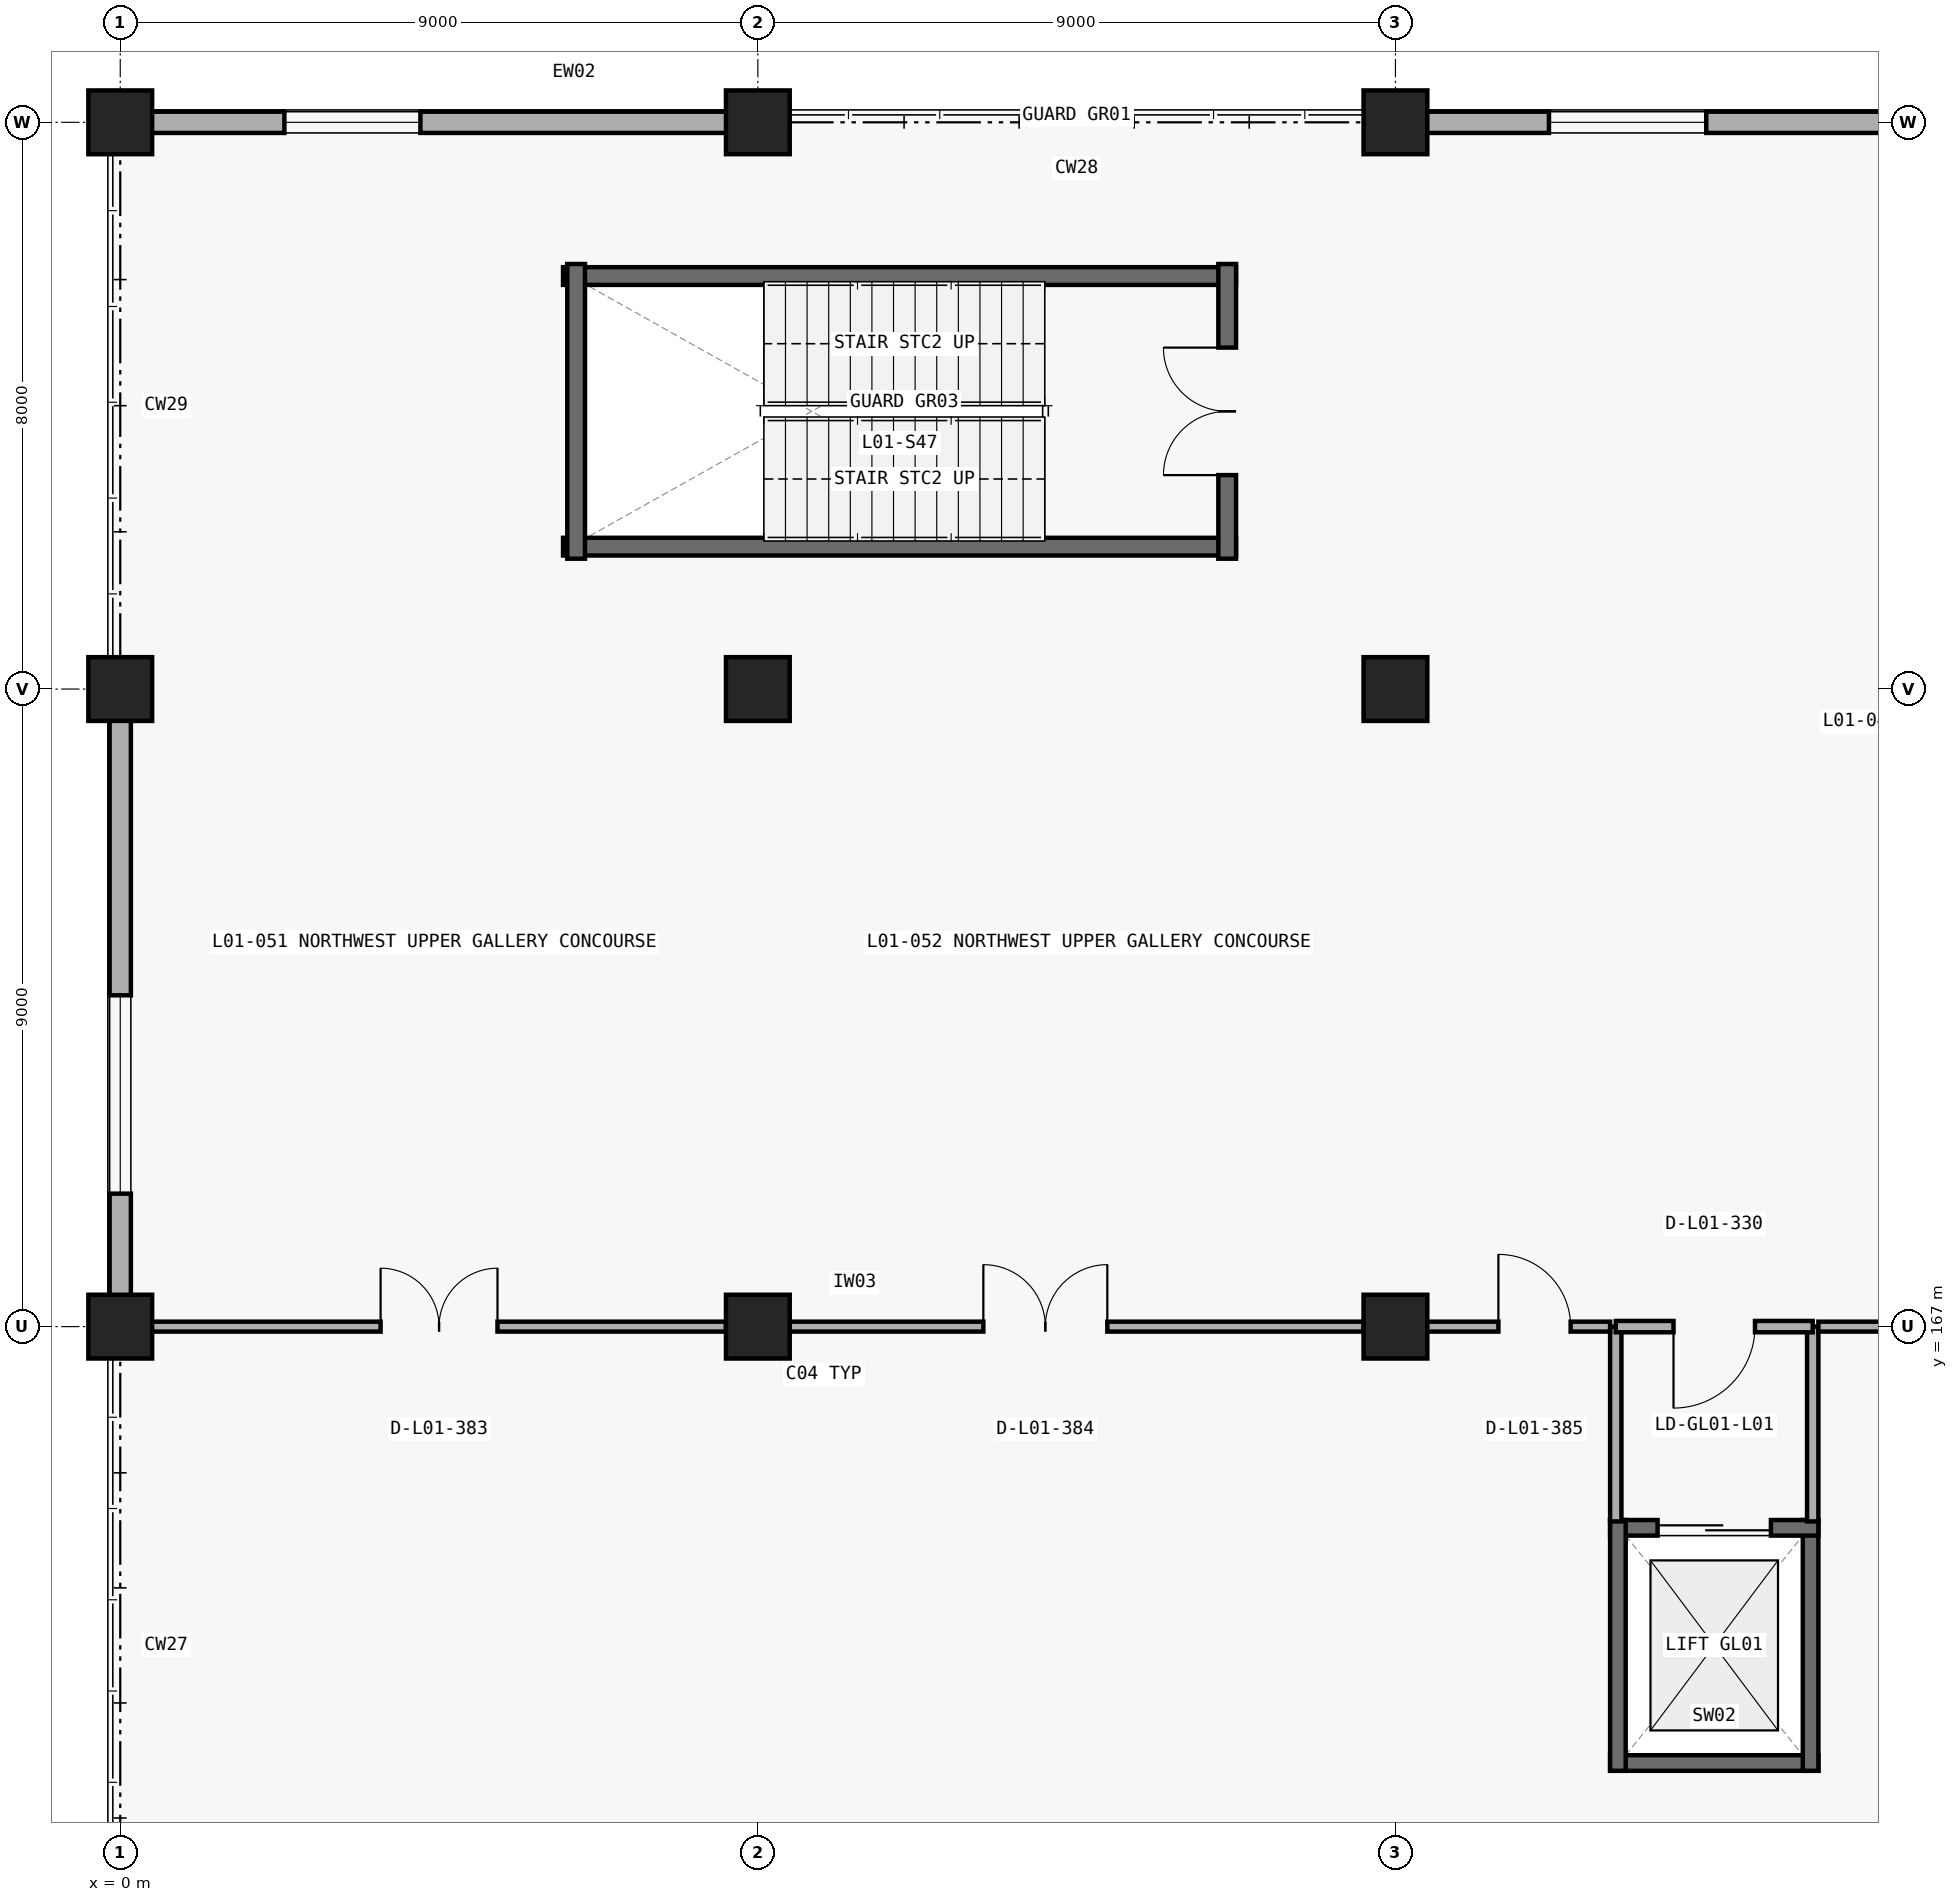
"""IFC4 building model, lengths in metres.
Left out: names, types, materials, properties, quantities, classifications, styles, units other than length and angle.
Written with IfcOpenShell. Run it as: python <this file> out.ifc"""

import sys

from ifc_helpers import new_model, si_unit, direction, frame, frame_2d, origin, origin_2d, place, context, subcontext, project, spatial, rectangle, extrude, element, fill, save


model = new_model("IFC4")
c1 = context("Model", 3, precision=1e-05, world=origin(), true_north=direction((0.0, 1.0)))
c2 = subcontext(c1, "Body", "Model", "MODEL_VIEW")
j1 = project(units=[si_unit("LENGTHUNIT", "METRE"), si_unit("PLANEANGLEUNIT", "RADIAN")], contexts=[c1])
p1 = place(None, origin())
s1 = spatial("IfcSite", under=j1, at=p1, CompositionType="ELEMENT")
p2 = place(p1, origin())
s2 = spatial("IfcBuilding", under=s1, at=p2, CompositionType="ELEMENT")
p3 = place(p2, frame((0.0, 0.0, 5.4)))
s3 = spatial("IfcBuildingStorey", under=s2, at=p3, CompositionType="ELEMENT", Elevation=5.4)
for number, where, z_axis, x_axis in (
    (1, (0.0, 167.0, 0.0), (0.0, 0.0, 1.0), (1.0, 0.0, 0.0)),
    (2, (0.0, 176.0, 0.0), (0.0, 0.0, 1.0), (1.0, 0.0, 0.0)),
    (3, (0.0, 184.0, 0.0), (0.0, 0.0, 1.0), (1.0, 0.0, 0.0)),
    (4, (9.0, 167.0, 0.0), (0.0, 0.0, 1.0), (1.0, 0.0, 0.0)),
    (5, (9.0, 176.0, 0.0), (0.0, 0.0, 1.0), (1.0, 0.0, 0.0)),
    (6, (9.0, 184.0, 0.0), (0.0, 0.0, 1.0), (1.0, 0.0, 0.0)),
    (7, (18.0, 167.0, 0.0), (0.0, 0.0, 1.0), (1.0, 0.0, 0.0)),
    (8, (18.0, 176.0, 0.0), (0.0, 0.0, 1.0), (1.0, 0.0, 0.0)),
    (9, (18.0, 184.0, 0.0), (0.0, 0.0, 1.0), (1.0, 0.0, 0.0)),
):
    element("IfcColumn", number, at=place(p3, frame(where, z_axis=z_axis, x_axis=x_axis)), inside=s3, PredefinedType="COLUMN", context=c2, shape_type="SweptSolid", body=[
        extrude(rectangle(XDim=0.9, YDim=0.9, at=origin_2d()), origin(), (0.0, 0.0, 1.0), 4.8),
    ])
p4 = place(p3, frame((0.0, 167.425, 0.0), z_axis=(0.0, 0.0, 1.0), x_axis=(0.0, 1.0, 0.0)))
e10 = element("IfcWall", 10, at=p4, inside=s3, PredefinedType="STANDARD", context=c2, shape_type="SweptSolid", body=[
    extrude(rectangle(XDim=8.15, YDim=0.3, at=frame_2d((4.075, 0.0))), origin(), (0.0, 0.0, 1.0), 3.837),
])
p5 = place(p4, frame((1.452, 0.0, 0.95)))
e11 = element("IfcOpeningElement", 11, at=p5, cuts=e10, PredefinedType="OPENING", context=c2, shape_type="SweptSolid", body=[
    extrude(rectangle(XDim=2.8, YDim=2.4, at=frame_2d((1.4, 1.2))), frame((0.0, 0.16, 0.0), z_axis=(0.0, -1.0, 0.0), x_axis=(1.0, 0.0, 0.0)), (0.0, 0.0, 1.0), 0.32),
])
p6 = place(p3, frame((0.425, 184.0, 0.0), z_axis=(0.0, 0.0, 1.0), x_axis=(1.0, 0.0, 0.0)))
e12 = element("IfcWall", 12, at=p6, inside=s3, PredefinedType="STANDARD", context=c2, shape_type="SweptSolid", body=[
    extrude(rectangle(XDim=8.15, YDim=0.3, at=frame_2d((4.075, 0.0))), origin(), (0.0, 0.0, 1.0), 3.804),
])
p7 = place(p6, frame((1.892, 0.0, 0.95)))
e13 = element("IfcOpeningElement", 13, at=p7, cuts=e12, PredefinedType="OPENING", context=c2, shape_type="SweptSolid", body=[
    extrude(rectangle(XDim=1.92, YDim=2.18, at=frame_2d((0.96, 1.09))), frame((0.0, 0.16, 0.0), z_axis=(0.0, -1.0, 0.0), x_axis=(1.0, 0.0, 0.0)), (0.0, 0.0, 1.0), 0.32),
])
p8 = place(p3, frame((18.425, 184.0, 0.0), z_axis=(0.0, 0.0, 1.0), x_axis=(1.0, 0.0, 0.0)))
e14 = element("IfcWall", 14, at=p8, inside=s3, PredefinedType="STANDARD", context=c2, shape_type="SweptSolid", body=[
    extrude(rectangle(XDim=8.15, YDim=0.3, at=frame_2d((4.075, 0.0))), origin(), (0.0, 0.0, 1.0), 3.804),
])
p9 = place(p8, frame((1.742, 0.0, 0.95)))
e15 = element("IfcOpeningElement", 15, at=p9, cuts=e14, PredefinedType="OPENING", context=c2, shape_type="SweptSolid", body=[
    extrude(rectangle(XDim=2.22, YDim=2.24, at=frame_2d((1.11, 1.12))), frame((0.0, 0.16, 0.0), z_axis=(0.0, -1.0, 0.0), x_axis=(1.0, 0.0, 0.0)), (0.0, 0.0, 1.0), 0.32),
])
for number, where, z_axis, x_axis in (
    (16, (15.75, 181.83, 0.0), (0.0, 0.0, 1.0), (-1.0, 0.0, 0.0)),
    (17, (6.25, 178.01, 0.0), (0.0, 0.0, 1.0), (1.0, 0.0, 0.0)),
):
    element("IfcWall", number, at=place(p3, frame(where, z_axis=z_axis, x_axis=x_axis)), inside=s3, PredefinedType="SHEAR", context=c2, shape_type="SweptSolid", body=[
        extrude(rectangle(XDim=9.5, YDim=0.25, at=frame_2d((4.75, 0.0))), origin(), (0.0, 0.0, 1.0), 4.52),
    ])
p10 = place(p3, frame((15.625, 177.84, 0.0), z_axis=(0.0, 0.0, 1.0), x_axis=(0.0, 1.0, 0.0)))
e18 = element("IfcWall", 18, at=p10, inside=s3, PredefinedType="SHEAR", context=c2, shape_type="SweptSolid", body=[
    extrude(rectangle(XDim=4.16, YDim=0.25, at=frame_2d((2.08, 0.0))), origin(), (0.0, 0.0, 1.0), 4.52),
])
p11 = place(p10, frame((1.18, 0.0, 0.0)))
e19 = element("IfcOpeningElement", 19, at=p11, cuts=e18, PredefinedType="OPENING", context=c2, shape_type="SweptSolid", body=[
    extrude(rectangle(XDim=1.8, YDim=2.25, at=frame_2d((0.9, 1.125))), frame((0.0, 0.135, 0.0), z_axis=(0.0, -1.0, 0.0), x_axis=(1.0, 0.0, 0.0)), (0.0, 0.0, 1.0), 0.27),
])
p12 = place(p3, frame((6.435, 182.0, 0.0), z_axis=(0.0, 0.0, 1.0), x_axis=(0.0, -1.0, 0.0)))
e20 = element("IfcWall", 20, at=p12, inside=s3, PredefinedType="SHEAR", context=c2, shape_type="SweptSolid", body=[
    extrude(rectangle(XDim=4.16, YDim=0.25, at=frame_2d((2.08, 0.0))), origin(), (0.0, 0.0, 1.0), 4.52),
])
p13 = place(p3, frame((21.03, 160.84, 0.0), z_axis=(0.0, 0.0, 1.0), x_axis=(1.0, 0.0, 0.0)))
e21 = element("IfcWall", 21, at=p13, inside=s3, PredefinedType="SHEAR", context=c2, shape_type="SweptSolid", body=[
    extrude(rectangle(XDim=2.94, YDim=0.22, at=frame_2d((1.47, 0.0))), origin(), (0.0, 0.0, 1.0), 4.52),
])
p14 = place(p3, frame((23.86, 160.73, 0.0), z_axis=(0.0, 0.0, 1.0), x_axis=(0.0, 1.0, 0.0)))
e22 = element("IfcWall", 22, at=p14, inside=s3, PredefinedType="SHEAR", context=c2, shape_type="SweptSolid", body=[
    extrude(rectangle(XDim=3.54, YDim=0.22, at=frame_2d((1.77, 0.0))), origin(), (0.0, 0.0, 1.0), 4.52),
])
p15 = place(p3, frame((23.97, 164.16, 0.0), z_axis=(0.0, 0.0, 1.0), x_axis=(-1.0, 0.0, 0.0)))
e23 = element("IfcWall", 23, at=p15, inside=s3, PredefinedType="SHEAR", context=c2, shape_type="SweptSolid", body=[
    extrude(rectangle(XDim=2.94, YDim=0.22, at=frame_2d((1.47, 0.0))), origin(), (0.0, 0.0, 1.0), 4.52),
])
p16 = place(p15, frame((0.67, 0.0, 0.0)))
e24 = element("IfcOpeningElement", 24, at=p16, cuts=e23, PredefinedType="OPENING", context=c2, shape_type="SweptSolid", body=[
    extrude(rectangle(XDim=1.6, YDim=2.3, at=frame_2d((0.8, 1.15))), frame((0.0, 0.12, 0.0), z_axis=(0.0, -1.0, 0.0), x_axis=(1.0, 0.0, 0.0)), (0.0, 0.0, 1.0), 0.24),
])
p17 = place(p3, frame((21.14, 164.27, 0.0), z_axis=(0.0, 0.0, 1.0), x_axis=(0.0, -1.0, 0.0)))
e25 = element("IfcWall", 25, at=p17, inside=s3, PredefinedType="SHEAR", context=c2, shape_type="SweptSolid", body=[
    extrude(rectangle(XDim=3.54, YDim=0.22, at=frame_2d((1.77, 0.0))), origin(), (0.0, 0.0, 1.0), 4.52),
])
for number, where, z_axis, x_axis in (
    (26, (23.89, 164.25, 0.0), (0.0, 0.0, 1.0), (0.0, 1.0, 0.0)),
    (27, (21.11, 164.25, 0.0), (0.0, 0.0, 1.0), (0.0, 1.0, 0.0)),
):
    element("IfcWall", number, at=place(p3, frame(where, z_axis=z_axis, x_axis=x_axis)), inside=s3, PredefinedType="PARTITIONING", context=c2, shape_type="SweptSolid", body=[
        extrude(rectangle(XDim=2.75, YDim=0.16, at=frame_2d((1.375, 0.0))), origin(), (0.0, 0.0, 1.0), 3.804),
    ])
p18 = place(p3, frame((23.89, 167.0, 0.0), z_axis=(0.0, 0.0, 1.0), x_axis=(-1.0, 0.0, 0.0)))
e28 = element("IfcWall", 28, at=p18, inside=s3, PredefinedType="PARTITIONING", context=c2, shape_type="SweptSolid", body=[
    extrude(rectangle(XDim=2.78, YDim=0.16, at=frame_2d((1.39, 0.0))), origin(), (0.0, 0.0, 1.0), 3.804),
])
p19 = place(p18, frame((0.815, 0.0, 0.0)))
e29 = element("IfcOpeningElement", 29, at=p19, cuts=e28, PredefinedType="OPENING", context=c2, shape_type="SweptSolid", body=[
    extrude(rectangle(XDim=1.15, YDim=2.2, at=frame_2d((0.575, 1.1))), frame((0.0, 0.09, 0.0), z_axis=(0.0, -1.0, 0.0), x_axis=(1.0, 0.0, 0.0)), (0.0, 0.0, 1.0), 0.18),
])
p20 = place(p3, frame((0.435, 167.0, 0.0), z_axis=(0.0, 0.0, 1.0), x_axis=(1.0, 0.0, 0.0)))
e30 = element("IfcWall", 30, at=p20, inside=s3, PredefinedType="PARTITIONING", context=c2, shape_type="SweptSolid", body=[
    extrude(rectangle(XDim=8.13, YDim=0.14, at=frame_2d((4.065, 0.0))), origin(), (0.0, 0.0, 1.0), 3.804),
])
p21 = place(p20, frame((3.24, 0.0, 0.0)))
e31 = element("IfcOpeningElement", 31, at=p21, cuts=e30, PredefinedType="OPENING", context=c2, shape_type="SweptSolid", body=[
    extrude(rectangle(XDim=1.65, YDim=2.25, at=frame_2d((0.825, 1.125))), frame((0.0, 0.08, 0.0), z_axis=(0.0, -1.0, 0.0), x_axis=(1.0, 0.0, 0.0)), (0.0, 0.0, 1.0), 0.16),
])
p22 = place(p3, frame((8.55, 167.0, 0.0), z_axis=(0.0, 0.0, 1.0), x_axis=(1.0, 0.0, 0.0)))
e32 = element("IfcWall", 32, at=p22, inside=s3, PredefinedType="PARTITIONING", context=c2, shape_type="SweptSolid", body=[
    extrude(rectangle(XDim=9.015, YDim=0.14, at=frame_2d((4.507, 0.0))), origin(), (0.0, 0.0, 1.0), 3.804),
])
p23 = place(p22, frame((3.633, 0.0, 0.0)))
e33 = element("IfcOpeningElement", 33, at=p23, cuts=e32, PredefinedType="OPENING", context=c2, shape_type="SweptSolid", body=[
    extrude(rectangle(XDim=1.75, YDim=2.3, at=frame_2d((0.875, 1.15))), frame((0.0, 0.08, 0.0), z_axis=(0.0, -1.0, 0.0), x_axis=(1.0, 0.0, 0.0)), (0.0, 0.0, 1.0), 0.16),
])
p24 = place(p3, frame((17.55, 167.0, 0.0), z_axis=(0.0, 0.0, 1.0), x_axis=(1.0, 0.0, 0.0)))
e34 = element("IfcWall", 34, at=p24, inside=s3, PredefinedType="PARTITIONING", context=c2, shape_type="SweptSolid", body=[
    extrude(rectangle(XDim=3.48, YDim=0.14, at=frame_2d((1.74, 0.0))), origin(), (0.0, 0.0, 1.0), 3.804),
])
p25 = place(p24, frame((1.903, 0.0, 0.0)))
e35 = element("IfcOpeningElement", 35, at=p25, cuts=e34, PredefinedType="OPENING", context=c2, shape_type="SweptSolid", body=[
    extrude(rectangle(XDim=1.02, YDim=2.2, at=frame_2d((0.51, 1.1))), frame((0.0, 0.08, 0.0), z_axis=(0.0, -1.0, 0.0), x_axis=(1.0, 0.0, 0.0)), (0.0, 0.0, 1.0), 0.16),
])
p26 = place(p3, frame((23.97, 167.0, 0.0), z_axis=(0.0, 0.0, 1.0), x_axis=(1.0, 0.0, 0.0)))
e36 = element("IfcWall", 36, at=p26, inside=s3, PredefinedType="PARTITIONING", context=c2, shape_type="SweptSolid", body=[
    extrude(rectangle(XDim=2.595, YDim=0.14, at=frame_2d((1.297, 0.0))), origin(), (0.0, 0.0, 1.0), 3.804),
])
p27 = place(p5, origin())
e37 = element("IfcWindow", 37, at=p27, inside=s3, PartitioningType="SINGLE_PANEL", PredefinedType="WINDOW", context=c2, shape_type="SweptSolid", body=[
    extrude(rectangle(XDim=2.8, YDim=2.4, at=frame_2d((1.4, 1.2))), frame((0.0, 0.03, 0.0), z_axis=(0.0, -1.0, 0.0), x_axis=(1.0, 0.0, 0.0)), (0.0, 0.0, 1.0), 0.06),
])
fill(e11, e37)
p28 = place(p7, origin())
e38 = element("IfcWindow", 38, at=p28, inside=s3, PartitioningType="SINGLE_PANEL", PredefinedType="WINDOW", context=c2, shape_type="SweptSolid", body=[
    extrude(rectangle(XDim=1.92, YDim=2.18, at=frame_2d((0.96, 1.09))), frame((0.0, 0.03, 0.0), z_axis=(0.0, -1.0, 0.0), x_axis=(1.0, 0.0, 0.0)), (0.0, 0.0, 1.0), 0.06),
])
fill(e13, e38)
p29 = place(p9, origin())
e39 = element("IfcWindow", 39, at=p29, inside=s3, PartitioningType="SINGLE_PANEL", PredefinedType="WINDOW", context=c2, shape_type="SweptSolid", body=[
    extrude(rectangle(XDim=2.22, YDim=2.24, at=frame_2d((1.11, 1.12))), frame((0.0, 0.03, 0.0), z_axis=(0.0, -1.0, 0.0), x_axis=(1.0, 0.0, 0.0)), (0.0, 0.0, 1.0), 0.06),
])
fill(e15, e39)
p30 = place(p11, origin())
e40 = element("IfcDoor", 40, at=p30, inside=s3, OperationType="DOUBLE_DOOR_SINGLE_SWING", PredefinedType="DOOR", context=c2, shape_type="SweptSolid", body=[
    extrude(rectangle(XDim=1.8, YDim=2.25, at=frame_2d((0.9, 1.125))), frame((0.0, 0.025, 0.0), z_axis=(0.0, -1.0, 0.0), x_axis=(1.0, 0.0, 0.0)), (0.0, 0.0, 1.0), 0.05),
])
fill(e19, e40)
p31 = place(p16, origin())
e41 = element("IfcDoor", 41, at=p31, inside=s3, OperationType="SLIDING_TO_LEFT", PredefinedType="DOOR", context=c2, shape_type="SweptSolid", body=[
    extrude(rectangle(XDim=1.6, YDim=2.3, at=frame_2d((0.8, 1.15))), frame((0.0, 0.025, 0.0), z_axis=(0.0, -1.0, 0.0), x_axis=(1.0, 0.0, 0.0)), (0.0, 0.0, 1.0), 0.05),
])
fill(e24, e41)
p32 = place(p19, origin())
e42 = element("IfcDoor", 42, at=p32, inside=s3, OperationType="SINGLE_SWING_RIGHT", PredefinedType="DOOR", context=c2, shape_type="SweptSolid", body=[
    extrude(rectangle(XDim=1.15, YDim=2.2, at=frame_2d((0.575, 1.1))), frame((0.0, 0.025, 0.0), z_axis=(0.0, -1.0, 0.0), x_axis=(1.0, 0.0, 0.0)), (0.0, 0.0, 1.0), 0.05),
])
fill(e29, e42)
p33 = place(p21, origin())
e43 = element("IfcDoor", 43, at=p33, inside=s3, OperationType="DOUBLE_DOOR_SINGLE_SWING", PredefinedType="DOOR", context=c2, shape_type="SweptSolid", body=[
    extrude(rectangle(XDim=1.65, YDim=2.25, at=frame_2d((0.825, 1.125))), frame((0.0, 0.025, 0.0), z_axis=(0.0, -1.0, 0.0), x_axis=(1.0, 0.0, 0.0)), (0.0, 0.0, 1.0), 0.05),
])
fill(e31, e43)
p34 = place(p23, origin())
e44 = element("IfcDoor", 44, at=p34, inside=s3, OperationType="DOUBLE_DOOR_SINGLE_SWING", PredefinedType="DOOR", context=c2, shape_type="SweptSolid", body=[
    extrude(rectangle(XDim=1.75, YDim=2.3, at=frame_2d((0.875, 1.15))), frame((0.0, 0.025, 0.0), z_axis=(0.0, -1.0, 0.0), x_axis=(1.0, 0.0, 0.0)), (0.0, 0.0, 1.0), 0.05),
])
fill(e33, e44)
p35 = place(p25, origin())
e45 = element("IfcDoor", 45, at=p35, inside=s3, OperationType="SINGLE_SWING_LEFT", PredefinedType="DOOR", context=c2, shape_type="SweptSolid", body=[
    extrude(rectangle(XDim=1.02, YDim=2.2, at=frame_2d((0.51, 1.1))), frame((0.0, 0.025, 0.0), z_axis=(0.0, -1.0, 0.0), x_axis=(1.0, 0.0, 0.0)), (0.0, 0.0, 1.0), 0.05),
])
fill(e35, e45)
save(model, sys.argv[1])
